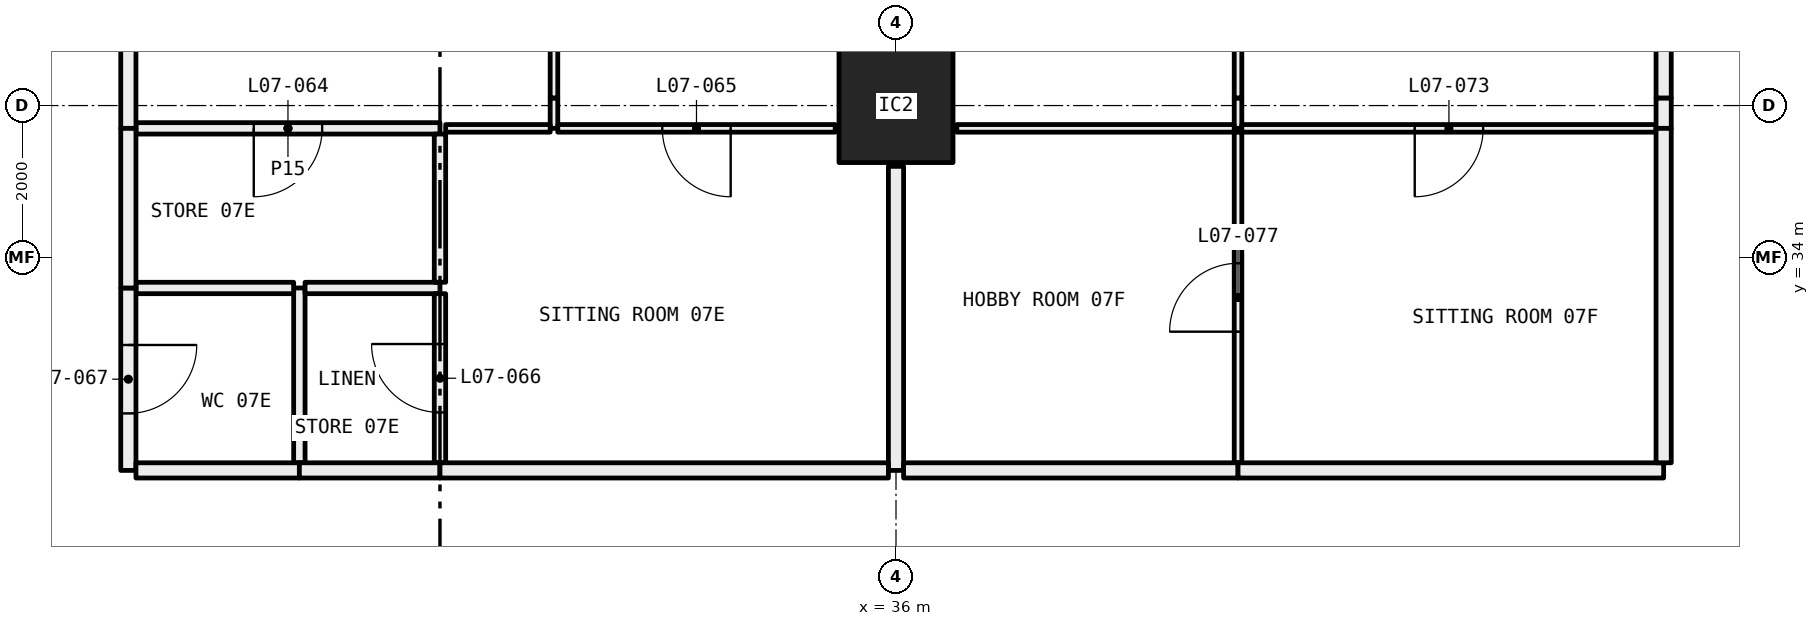
"""IFC4 building model, lengths in metres.
Left out: names, types, materials, properties, quantities, classifications, styles, units other than length and angle.
Written with IfcOpenShell. Run it as: python <this file> out.ifc"""

import sys

from ifc_helpers import new_model, si_unit, direction, frame, frame_2d, origin, origin_2d, place, context, subcontext, project, spatial, rectangle, hollow_rectangle, extrude, element, fill, save


model = new_model("IFC4")
c1 = context("Model", 3, precision=1e-05, world=origin(), true_north=direction((0.0, 1.0)))
c2 = subcontext(c1, "Body", "Model", "MODEL_VIEW")
j1 = project(units=[si_unit("LENGTHUNIT", "METRE"), si_unit("PLANEANGLEUNIT", "RADIAN")], contexts=[c1])
p1 = place(None, origin())
s1 = spatial("IfcSite", under=j1, at=p1, CompositionType="ELEMENT")
p2 = place(p1, origin())
s2 = spatial("IfcBuilding", under=s1, at=p2, CompositionType="ELEMENT")
p3 = place(p2, frame((0.0, 0.0, 36.9)))
s3 = spatial("IfcBuildingStorey", under=s2, at=p3, CompositionType="ELEMENT", Elevation=36.9)
p4 = place(p3, frame((36.0, 36.0, 0.0), z_axis=(0.0, 0.0, 1.0), x_axis=(1.0, 0.0, 0.0)))
e1 = element("IfcColumn", 1, at=p4, inside=s3, PredefinedType="COLUMN", context=c2, shape_type="SweptSolid", body=[
    extrude(hollow_rectangle(XDim=1.5, YDim=1.5, WallThickness=0.065, at=origin_2d()), origin(), (0.0, 0.0, 1.0), 3.05),
])
p5 = place(p3, frame((31.5, 35.7, 0.0), z_axis=(0.0, 0.0, 1.0), x_axis=(0.0, 1.0, 0.0)))
e2 = element("IfcWall", 2, at=p5, inside=s3, PredefinedType="PARTITIONING", context=c2, shape_type="SweptSolid", body=[
    extrude(rectangle(XDim=0.4, YDim=0.1, at=frame_2d((0.2, 0.0))), origin(), (0.0, 0.0, 1.0), 2.45),
])
p6 = place(p3, frame((31.5, 36.1, 0.0), z_axis=(0.0, 0.0, 1.0), x_axis=(0.0, 1.0, 0.0)))
e3 = element("IfcWall", 3, at=p6, inside=s3, PredefinedType="PARTITIONING", context=c2, shape_type="SweptSolid", body=[
    extrude(rectangle(XDim=5.825, YDim=0.1, at=frame_2d((2.913, 0.0))), origin(), (0.0, 0.0, 1.0), 3.05),
])
p7 = place(p6, frame((2.462, 0.0, 0.0)))
e4 = element("IfcOpeningElement", 4, at=p7, cuts=e3, PredefinedType="OPENING", context=c2, shape_type="SweptSolid", body=[
    extrude(rectangle(XDim=0.9, YDim=2.1, at=frame_2d((0.45, 1.05))), frame((0.0, 0.06, 0.0), z_axis=(0.0, -1.0, 0.0), x_axis=(1.0, 0.0, 0.0)), (0.0, 0.0, 1.0), 0.12),
])
p8 = place(p3, frame((26.0, 35.7, 0.0), z_axis=(0.0, 0.0, 1.0), x_axis=(1.0, 0.0, 0.0)))
e5 = element("IfcWall", 5, at=p8, inside=s3, PredefinedType="PARTITIONING", context=c2, shape_type="SweptSolid", body=[
    extrude(rectangle(XDim=4.0, YDim=0.15, at=frame_2d((2.0, 0.0))), origin(), (0.0, 0.0, 1.0), 3.05),
])
p9 = place(p8, frame((1.55, 0.0, 0.0)))
e6 = element("IfcOpeningElement", 6, at=p9, cuts=e5, PredefinedType="OPENING", context=c2, shape_type="SweptSolid", body=[
    extrude(rectangle(XDim=0.9, YDim=2.1, at=frame_2d((0.45, 1.05))), frame((0.0, 0.085, 0.0), z_axis=(0.0, -1.0, 0.0), x_axis=(1.0, 0.0, 0.0)), (0.0, 0.0, 1.0), 0.17),
])
p10 = place(p3, frame((30.075, 35.7, 0.0), z_axis=(0.0, 0.0, 1.0), x_axis=(1.0, 0.0, 0.0)))
e7 = element("IfcWall", 7, at=p10, inside=s3, PredefinedType="PARTITIONING", context=c2, shape_type="SweptSolid", body=[
    extrude(rectangle(XDim=1.375, YDim=0.1, at=frame_2d((0.688, 0.0))), origin(), (0.0, 0.0, 1.0), 3.05),
])
p11 = place(p3, frame((25.9, 41.9, 0.0), z_axis=(0.0, 0.0, 1.0), x_axis=(0.0, -1.0, 0.0)))
e8 = element("IfcWall", 8, at=p11, inside=s3, PredefinedType="PARTITIONING", context=c2, shape_type="SweptSolid", body=[
    extrude(rectangle(XDim=6.2, YDim=0.2, at=frame_2d((3.1, 0.0))), origin(), (0.0, 0.0, 1.0), 2.45),
])
p12 = place(p3, frame((31.55, 35.7, 0.0), z_axis=(0.0, 0.0, 1.0), x_axis=(1.0, 0.0, 0.0)))
e9 = element("IfcWall", 9, at=p12, inside=s3, PredefinedType="PARTITIONING", context=c2, shape_type="SweptSolid", body=[
    extrude(rectangle(XDim=3.65, YDim=0.1, at=frame_2d((1.825, 0.0))), origin(), (0.0, 0.0, 1.0), 3.05),
])
p13 = place(p12, frame((1.375, 0.0, 0.0)))
e10 = element("IfcOpeningElement", 10, at=p13, cuts=e9, PredefinedType="OPENING", context=c2, shape_type="SweptSolid", body=[
    extrude(rectangle(XDim=0.9, YDim=2.1, at=frame_2d((0.45, 1.05))), frame((0.0, 0.06, 0.0), z_axis=(0.0, -1.0, 0.0), x_axis=(1.0, 0.0, 0.0)), (0.0, 0.0, 1.0), 0.12),
])
p14 = place(p3, frame((28.15, 31.3, 0.0), z_axis=(0.0, 0.0, 1.0), x_axis=(0.0, 1.0, 0.0)))
e11 = element("IfcWall", 11, at=p14, inside=s3, PredefinedType="PARTITIONING", context=c2, shape_type="SweptSolid", body=[
    extrude(rectangle(XDim=2.3, YDim=0.15, at=frame_2d((1.15, 0.0))), origin(), (0.0, 0.0, 1.0), 3.05),
])
p15 = place(p3, frame((28.075, 33.6, 0.0), z_axis=(0.0, 0.0, 1.0), x_axis=(-1.0, 0.0, 0.0)))
e12 = element("IfcWall", 12, at=p15, inside=s3, PredefinedType="PARTITIONING", context=c2, shape_type="SweptSolid", body=[
    extrude(rectangle(XDim=2.075, YDim=0.15, at=frame_2d((1.038, 0.0))), origin(), (0.0, 0.0, 1.0), 3.05),
])
p16 = place(p3, frame((25.9, 33.6, 0.0), z_axis=(0.0, 0.0, 1.0), x_axis=(0.0, -1.0, 0.0)))
e13 = element("IfcWall", 13, at=p16, inside=s3, PredefinedType="PARTITIONING", context=c2, shape_type="SweptSolid", body=[
    extrude(rectangle(XDim=2.4, YDim=0.2, at=frame_2d((1.2, 0.0))), origin(), (0.0, 0.0, 1.0), 3.05),
])
p17 = place(p16, frame((0.75, 0.0, 0.0)))
e14 = element("IfcOpeningElement", 14, at=p17, cuts=e13, PredefinedType="OPENING", context=c2, shape_type="SweptSolid", body=[
    extrude(rectangle(XDim=0.9, YDim=2.1, at=frame_2d((0.45, 1.05))), frame((0.0, 0.11, 0.0), z_axis=(0.0, -1.0, 0.0), x_axis=(1.0, 0.0, 0.0)), (0.0, 0.0, 1.0), 0.22),
])
p18 = place(p3, frame((26.0, 31.2, 0.0), z_axis=(0.0, 0.0, 1.0), x_axis=(1.0, 0.0, 0.0)))
e15 = element("IfcWall", 15, at=p18, inside=s3, PredefinedType="PARTITIONING", context=c2, shape_type="SweptSolid", body=[
    extrude(rectangle(XDim=2.15, YDim=0.2, at=frame_2d((1.075, 0.0))), origin(), (0.0, 0.0, 1.0), 3.05),
])
p19 = place(p3, frame((30.0, 33.6, 0.0), z_axis=(0.0, 0.0, 1.0), x_axis=(-1.0, 0.0, 0.0)))
e16 = element("IfcWall", 16, at=p19, inside=s3, PredefinedType="PARTITIONING", context=c2, shape_type="SweptSolid", body=[
    extrude(rectangle(XDim=1.775, YDim=0.15, at=frame_2d((0.887, 0.0))), origin(), (0.0, 0.0, 1.0), 3.05),
])
p20 = place(p3, frame((30.0, 31.3, 0.0), z_axis=(0.0, 0.0, 1.0), x_axis=(0.0, 1.0, 0.0)))
e17 = element("IfcWall", 17, at=p20, inside=s3, PredefinedType="PARTITIONING", context=c2, shape_type="SweptSolid", body=[
    extrude(rectangle(XDim=2.225, YDim=0.15, at=frame_2d((1.112, 0.0))), origin(), (0.0, 0.0, 1.0), 3.05),
])
p21 = place(p20, frame((0.663, 0.0, 0.0)))
e18 = element("IfcOpeningElement", 18, at=p21, cuts=e17, PredefinedType="OPENING", context=c2, shape_type="SweptSolid", body=[
    extrude(rectangle(XDim=0.9, YDim=2.1, at=frame_2d((0.45, 1.05))), frame((0.0, 0.085, 0.0), z_axis=(0.0, -1.0, 0.0), x_axis=(1.0, 0.0, 0.0)), (0.0, 0.0, 1.0), 0.17),
])
p22 = place(p3, frame((28.15, 31.2, 0.0), z_axis=(0.0, 0.0, 1.0), x_axis=(1.0, 0.0, 0.0)))
e19 = element("IfcWall", 19, at=p22, inside=s3, PredefinedType="PARTITIONING", context=c2, shape_type="SweptSolid", body=[
    extrude(rectangle(XDim=1.85, YDim=0.2, at=frame_2d((0.925, 0.0))), origin(), (0.0, 0.0, 1.0), 3.05),
])
p23 = place(p3, frame((30.0, 33.675, 0.0), z_axis=(0.0, 0.0, 1.0), x_axis=(0.0, 1.0, 0.0)))
e20 = element("IfcWall", 20, at=p23, inside=s3, PredefinedType="PARTITIONING", context=c2, shape_type="SweptSolid", body=[
    extrude(rectangle(XDim=1.95, YDim=0.15, at=frame_2d((0.975, 0.0))), origin(), (0.0, 0.0, 1.0), 3.05),
])
p24 = place(p3, frame((25.9, 35.7, 0.0), z_axis=(0.0, 0.0, 1.0), x_axis=(0.0, -1.0, 0.0)))
e21 = element("IfcWall", 21, at=p24, inside=s3, PredefinedType="PARTITIONING", context=c2, shape_type="SweptSolid", body=[
    extrude(rectangle(XDim=2.1, YDim=0.2, at=frame_2d((1.05, 0.0))), origin(), (0.0, 0.0, 1.0), 3.05),
])
p25 = place(p3, frame((36.0, 31.2, 0.0), z_axis=(0.0, 0.0, 1.0), x_axis=(0.0, 1.0, 0.0)))
e22 = element("IfcWall", 22, at=p25, inside=s3, PredefinedType="PARTITIONING", context=c2, shape_type="SweptSolid", body=[
    extrude(rectangle(XDim=4.0, YDim=0.2, at=frame_2d((2.0, 0.0))), origin(), (0.0, 0.0, 1.0), 2.45),
])
p26 = place(p3, frame((30.0, 31.2, 0.0), z_axis=(0.0, 0.0, 1.0), x_axis=(1.0, 0.0, 0.0)))
e23 = element("IfcWall", 23, at=p26, inside=s3, PredefinedType="PARTITIONING", context=c2, shape_type="SweptSolid", body=[
    extrude(rectangle(XDim=5.9, YDim=0.2, at=frame_2d((2.95, 0.0))), origin(), (0.0, 0.0, 1.0), 3.05),
])
p27 = place(p3, frame((40.5, 35.7, 0.0), z_axis=(0.0, 0.0, 1.0), x_axis=(0.0, 1.0, 0.0)))
e24 = element("IfcWall", 24, at=p27, inside=s3, PredefinedType="PARTITIONING", context=c2, shape_type="SweptSolid", body=[
    extrude(rectangle(XDim=0.4, YDim=0.1, at=frame_2d((0.2, 0.0))), origin(), (0.0, 0.0, 1.0), 2.45),
])
p28 = place(p3, frame((40.5, 36.1, 0.0), z_axis=(0.0, 0.0, 1.0), x_axis=(0.0, 1.0, 0.0)))
e25 = element("IfcWall", 25, at=p28, inside=s3, PredefinedType="PARTITIONING", context=c2, shape_type="SweptSolid", body=[
    extrude(rectangle(XDim=5.825, YDim=0.1, at=frame_2d((2.913, 0.0))), origin(), (0.0, 0.0, 1.0), 3.05),
])
p29 = place(p28, frame((2.462, 0.0, 0.0)))
e26 = element("IfcOpeningElement", 26, at=p29, cuts=e25, PredefinedType="OPENING", context=c2, shape_type="SweptSolid", body=[
    extrude(rectangle(XDim=0.9, YDim=2.1, at=frame_2d((0.45, 1.05))), frame((0.0, 0.06, 0.0), z_axis=(0.0, -1.0, 0.0), x_axis=(1.0, 0.0, 0.0)), (0.0, 0.0, 1.0), 0.12),
])
p30 = place(p3, frame((36.8, 35.7, 0.0), z_axis=(0.0, 0.0, 1.0), x_axis=(1.0, 0.0, 0.0)))
e27 = element("IfcWall", 27, at=p30, inside=s3, PredefinedType="PARTITIONING", context=c2, shape_type="SweptSolid", body=[
    extrude(rectangle(XDim=3.65, YDim=0.1, at=frame_2d((1.825, 0.0))), origin(), (0.0, 0.0, 1.0), 3.05),
])
p31 = place(p3, frame((40.55, 35.7, 0.0), z_axis=(0.0, 0.0, 1.0), x_axis=(1.0, 0.0, 0.0)))
e28 = element("IfcWall", 28, at=p31, inside=s3, PredefinedType="PARTITIONING", context=c2, shape_type="SweptSolid", body=[
    extrude(rectangle(XDim=5.45, YDim=0.1, at=frame_2d((2.725, 0.0))), origin(), (0.0, 0.0, 1.0), 3.05),
])
p32 = place(p31, frame((2.275, 0.0, 0.0)))
e29 = element("IfcOpeningElement", 29, at=p32, cuts=e28, PredefinedType="OPENING", context=c2, shape_type="SweptSolid", body=[
    extrude(rectangle(XDim=0.9, YDim=2.1, at=frame_2d((0.45, 1.05))), frame((0.0, 0.06, 0.0), z_axis=(0.0, -1.0, 0.0), x_axis=(1.0, 0.0, 0.0)), (0.0, 0.0, 1.0), 0.12),
])
p33 = place(p3, frame((46.1, 35.7, 0.0), z_axis=(0.0, 0.0, 1.0), x_axis=(0.0, 1.0, 0.0)))
e30 = element("IfcWall", 30, at=p33, inside=s3, PredefinedType="PARTITIONING", context=c2, shape_type="SweptSolid", body=[
    extrude(rectangle(XDim=0.4, YDim=0.2, at=frame_2d((0.2, 0.0))), origin(), (0.0, 0.0, 1.0), 2.45),
])
p34 = place(p3, frame((46.1, 36.1, 0.0), z_axis=(0.0, 0.0, 1.0), x_axis=(0.0, 1.0, 0.0)))
e31 = element("IfcWall", 31, at=p34, inside=s3, PredefinedType="PARTITIONING", context=c2, shape_type="SweptSolid", body=[
    extrude(rectangle(XDim=5.8, YDim=0.2, at=frame_2d((2.9, 0.0))), origin(), (0.0, 0.0, 1.0), 3.05),
])
p35 = place(p3, frame((40.5, 31.3, 0.0), z_axis=(0.0, 0.0, 1.0), x_axis=(0.0, 1.0, 0.0)))
e32 = element("IfcWall", 32, at=p35, inside=s3, PredefinedType="PARTITIONING", context=c2, shape_type="SweptSolid", body=[
    extrude(rectangle(XDim=4.35, YDim=0.1, at=frame_2d((2.175, 0.0))), origin(), (0.0, 0.0, 1.0), 3.05),
])
p36 = place(p35, frame((1.725, 0.0, 0.0)))
e33 = element("IfcOpeningElement", 33, at=p36, cuts=e32, PredefinedType="OPENING", context=c2, shape_type="SweptSolid", body=[
    extrude(rectangle(XDim=0.9, YDim=2.1, at=frame_2d((0.45, 1.05))), frame((0.0, 0.06, 0.0), z_axis=(0.0, -1.0, 0.0), x_axis=(1.0, 0.0, 0.0)), (0.0, 0.0, 1.0), 0.12),
])
p37 = place(p3, frame((36.1, 31.2, 0.0), z_axis=(0.0, 0.0, 1.0), x_axis=(1.0, 0.0, 0.0)))
e34 = element("IfcWall", 34, at=p37, inside=s3, PredefinedType="PARTITIONING", context=c2, shape_type="SweptSolid", body=[
    extrude(rectangle(XDim=4.4, YDim=0.2, at=frame_2d((2.2, 0.0))), origin(), (0.0, 0.0, 1.0), 3.05),
])
p38 = place(p3, frame((40.5, 31.2, 0.0), z_axis=(0.0, 0.0, 1.0), x_axis=(1.0, 0.0, 0.0)))
e35 = element("IfcWall", 35, at=p38, inside=s3, PredefinedType="PARTITIONING", context=c2, shape_type="SweptSolid", body=[
    extrude(rectangle(XDim=5.6, YDim=0.2, at=frame_2d((2.8, 0.0))), origin(), (0.0, 0.0, 1.0), 3.05),
])
p39 = place(p3, frame((46.1, 31.3, 0.0), z_axis=(0.0, 0.0, 1.0), x_axis=(0.0, 1.0, 0.0)))
e36 = element("IfcWall", 36, at=p39, inside=s3, PredefinedType="PARTITIONING", context=c2, shape_type="SweptSolid", body=[
    extrude(rectangle(XDim=4.4, YDim=0.2, at=frame_2d((2.2, 0.0))), origin(), (0.0, 0.0, 1.0), 3.05),
])
p40 = place(p9, frame((0.9, 0.0, 0.0), x_axis=(-1.0, 0.0, 0.0)))
e37 = element("IfcDoor", 37, at=p40, inside=s3, OperationType="SINGLE_SWING_LEFT", PredefinedType="DOOR", context=c2, shape_type="SweptSolid", body=[
    extrude(rectangle(XDim=0.9, YDim=2.1, at=frame_2d((0.45, 1.05))), frame((0.0, 0.025, 0.0), z_axis=(0.0, -1.0, 0.0), x_axis=(1.0, 0.0, 0.0)), (0.0, 0.0, 1.0), 0.05),
])
fill(e6, e37)
p41 = place(p13, frame((0.9, 0.0, 0.0), x_axis=(-1.0, 0.0, 0.0)))
e38 = element("IfcDoor", 38, at=p41, inside=s3, OperationType="SINGLE_SWING_RIGHT", PredefinedType="DOOR", context=c2, shape_type="SweptSolid", body=[
    extrude(rectangle(XDim=0.9, YDim=2.1, at=frame_2d((0.45, 1.05))), frame((0.0, 0.025, 0.0), z_axis=(0.0, -1.0, 0.0), x_axis=(1.0, 0.0, 0.0)), (0.0, 0.0, 1.0), 0.05),
])
fill(e10, e38)
p42 = place(p21, origin())
e39 = element("IfcDoor", 39, at=p42, inside=s3, OperationType="SINGLE_SWING_LEFT", PredefinedType="DOOR", context=c2, shape_type="SweptSolid", body=[
    extrude(rectangle(XDim=0.9, YDim=2.1, at=frame_2d((0.45, 1.05))), frame((0.0, 0.025, 0.0), z_axis=(0.0, -1.0, 0.0), x_axis=(1.0, 0.0, 0.0)), (0.0, 0.0, 1.0), 0.05),
])
fill(e18, e39)
p43 = place(p17, origin())
e40 = element("IfcDoor", 40, at=p43, inside=s3, OperationType="SINGLE_SWING_RIGHT", PredefinedType="DOOR", context=c2, shape_type="SweptSolid", body=[
    extrude(rectangle(XDim=0.9, YDim=2.1, at=frame_2d((0.45, 1.05))), frame((0.0, 0.025, 0.0), z_axis=(0.0, -1.0, 0.0), x_axis=(1.0, 0.0, 0.0)), (0.0, 0.0, 1.0), 0.05),
])
fill(e14, e40)
p44 = place(p32, frame((0.9, 0.0, 0.0), x_axis=(-1.0, 0.0, 0.0)))
e41 = element("IfcDoor", 41, at=p44, inside=s3, OperationType="SINGLE_SWING_LEFT", PredefinedType="DOOR", context=c2, shape_type="SweptSolid", body=[
    extrude(rectangle(XDim=0.9, YDim=2.1, at=frame_2d((0.45, 1.05))), frame((0.0, 0.025, 0.0), z_axis=(0.0, -1.0, 0.0), x_axis=(1.0, 0.0, 0.0)), (0.0, 0.0, 1.0), 0.05),
])
fill(e29, e41)
p45 = place(p36, origin())
e42 = element("IfcDoor", 42, at=p45, inside=s3, OperationType="SINGLE_SWING_RIGHT", PredefinedType="DOOR", context=c2, shape_type="SweptSolid", body=[
    extrude(rectangle(XDim=0.9, YDim=2.1, at=frame_2d((0.45, 1.05))), frame((0.0, 0.025, 0.0), z_axis=(0.0, -1.0, 0.0), x_axis=(1.0, 0.0, 0.0)), (0.0, 0.0, 1.0), 0.05),
])
fill(e33, e42)
save(model, sys.argv[1])
